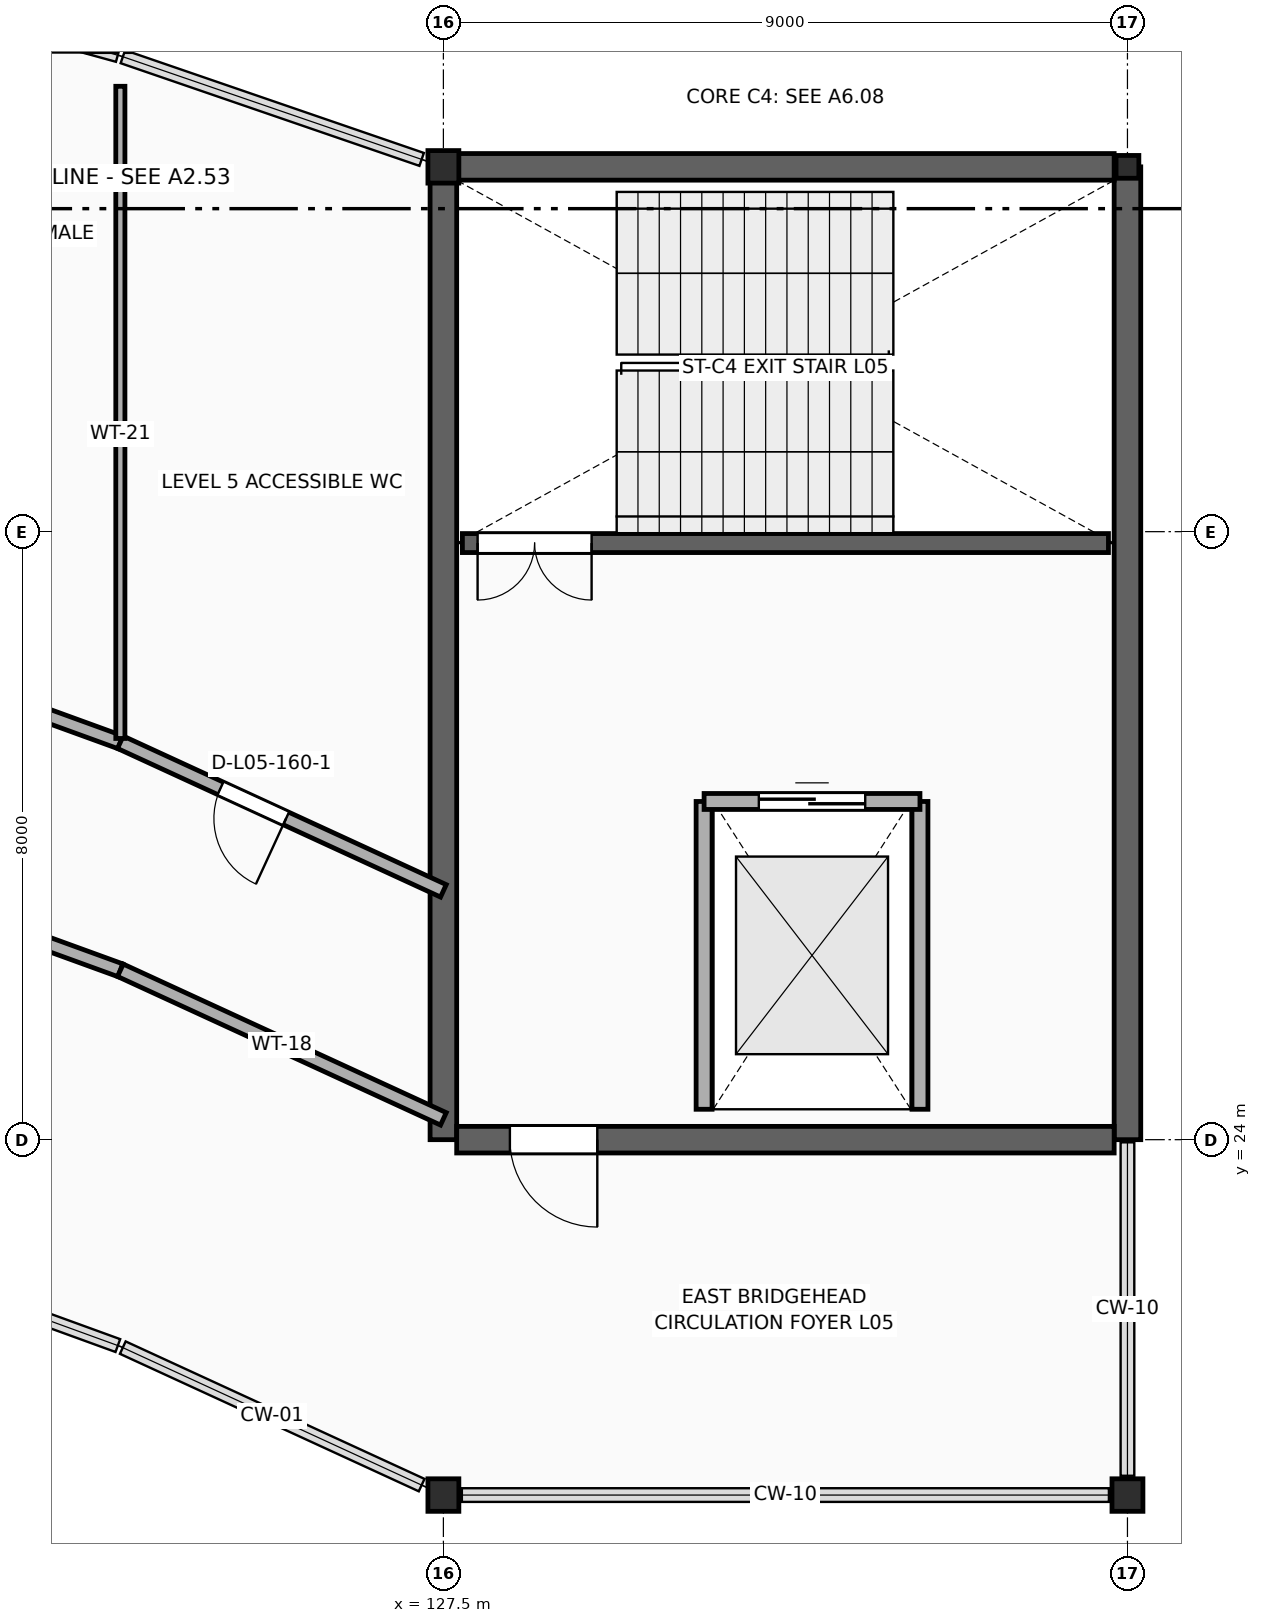
"""IFC4 building model, lengths in metres.
Left out: names, types, materials, properties, quantities, classifications, styles, units other than length and angle.
Written with IfcOpenShell. Run it as: python <this file> out.ifc"""

import sys

from ifc_helpers import new_model, si_unit, direction, frame, frame_2d, origin, origin_2d, place, context, subcontext, project, spatial, rectangle, i_section, extrude, element, fill, save


model = new_model("IFC4")
c1 = context("Model", 3, precision=1e-05, world=origin(), true_north=direction((0.0, 1.0)))
c2 = subcontext(c1, "Body", "Model", "MODEL_VIEW")
j1 = project(units=[si_unit("LENGTHUNIT", "METRE"), si_unit("PLANEANGLEUNIT", "RADIAN")], contexts=[c1])
p1 = place(None, origin())
s1 = spatial("IfcSite", under=j1, at=p1, CompositionType="ELEMENT")
p2 = place(p1, origin())
s2 = spatial("IfcBuilding", under=s1, at=p2, CompositionType="ELEMENT")
p3 = place(p2, frame((0.0, 0.0, 24.6)))
s3 = spatial("IfcBuildingStorey", under=s2, at=p3, CompositionType="ELEMENT", Elevation=24.6)
for number, where, z_axis, x_axis in (
    (1, (127.5, 24.0, 0.0), (0.0, 0.0, 1.0), (0.0, 1.0, 0.0)),
    (2, (136.5, 24.0, 0.0), (0.0, 0.0, 1.0), (0.0, 1.0, 0.0)),
):
    element("IfcWall", number, at=place(p3, frame(where, z_axis=z_axis, x_axis=x_axis)), inside=s3, PredefinedType="SHEAR", context=c2, shape_type="SweptSolid", body=[
        extrude(rectangle(XDim=12.8, YDim=0.35, at=frame_2d((6.4, 0.0))), origin(), (0.0, 0.0, 1.0), 4.64),
    ])
p4 = place(p3, frame((127.675, 36.8, 0.0), z_axis=(0.0, 0.0, 1.0), x_axis=(1.0, 0.0, 0.0)))
e3 = element("IfcWall", 3, at=p4, inside=s3, PredefinedType="SHEAR", context=c2, shape_type="SweptSolid", body=[
    extrude(rectangle(XDim=8.65, YDim=0.35, at=frame_2d((4.325, 0.0))), origin(), (0.0, 0.0, 1.0), 4.64),
])
p5 = place(p3, frame((127.675, 24.0, 0.0), z_axis=(0.0, 0.0, 1.0), x_axis=(1.0, 0.0, 0.0)))
e4 = element("IfcWall", 4, at=p5, inside=s3, PredefinedType="SHEAR", context=c2, shape_type="SweptSolid", body=[
    extrude(rectangle(XDim=8.65, YDim=0.35, at=frame_2d((4.325, 0.0))), origin(), (0.0, 0.0, 1.0), 4.64),
])
p6 = place(p5, frame((0.7, 0.0, 0.0)))
e5 = element("IfcOpeningElement", 5, at=p6, cuts=e4, PredefinedType="OPENING", context=c2, shape_type="SweptSolid", body=[
    extrude(rectangle(XDim=1.15, YDim=2.2, at=frame_2d((0.575, 1.1))), frame((0.0, 0.187, 0.0), z_axis=(0.0, -1.0, 0.0), x_axis=(1.0, 0.0, 0.0)), (0.0, 0.0, 1.0), 0.374),
])
p7 = place(p3, frame((127.75, 31.85, 0.0), z_axis=(0.0, 0.0, 1.0), x_axis=(1.0, 0.0, 0.0)))
e6 = element("IfcWall", 6, at=p7, inside=s3, PredefinedType="STANDARD", context=c2, shape_type="SweptSolid", body=[
    extrude(rectangle(XDim=8.5, YDim=0.25, at=frame_2d((4.25, 0.0))), origin(), (0.0, 0.0, 1.0), 4.64),
])
p8 = place(p7, frame((0.2, 0.0, 0.0)))
e7 = element("IfcOpeningElement", 7, at=p8, cuts=e6, PredefinedType="OPENING", context=c2, shape_type="SweptSolid", body=[
    extrude(rectangle(XDim=1.5, YDim=2.2, at=frame_2d((0.75, 1.1))), frame((0.0, 0.137, 0.0), z_axis=(0.0, -1.0, 0.0), x_axis=(1.0, 0.0, 0.0)), (0.0, 0.0, 1.0), 0.274),
])
for number, where, z_axis, x_axis in (
    (8, (130.93, 24.4, 0.0), (0.0, 0.0, 1.0), (0.0, 1.0, 0.0)),
    (9, (133.77, 24.4, 0.0), (0.0, 0.0, 1.0), (0.0, 1.0, 0.0)),
):
    element("IfcWall", number, at=place(p3, frame(where, z_axis=z_axis, x_axis=x_axis)), inside=s3, PredefinedType="PARTITIONING", context=c2, shape_type="SweptSolid", body=[
        extrude(rectangle(XDim=4.05, YDim=0.21, at=frame_2d((2.025, 0.0))), origin(), (0.0, 0.0, 1.0), 4.64),
    ])
p9 = place(p3, frame((130.93, 28.45, 0.0), z_axis=(0.0, 0.0, 1.0), x_axis=(1.0, 0.0, 0.0)))
e10 = element("IfcWall", 10, at=p9, inside=s3, PredefinedType="PARTITIONING", context=c2, shape_type="SweptSolid", body=[
    extrude(rectangle(XDim=2.84, YDim=0.21, at=frame_2d((1.42, 0.0))), origin(), (0.0, 0.0, 1.0), 4.64),
])
p10 = place(p9, frame((0.72, 0.0, 0.0)))
e11 = element("IfcOpeningElement", 11, at=p10, cuts=e10, PredefinedType="OPENING", context=c2, shape_type="SweptSolid", body=[
    extrude(rectangle(XDim=1.4, YDim=2.35, at=frame_2d((0.7, 1.175))), frame((0.0, 0.117, 0.0), z_axis=(0.0, -1.0, 0.0), x_axis=(1.0, 0.0, 0.0)), (0.0, 0.0, 1.0), 0.234),
])
p11 = place(p3, frame((127.5, 36.8, 0.0), z_axis=(0.0, 0.0, 1.0), x_axis=(1.0, 0.0, 0.0)))
e12 = element("IfcColumn", 12, at=p11, inside=s3, PredefinedType="COLUMN", context=c2, shape_type="SweptSolid", body=[
    extrude(i_section(OverallWidth=0.407, OverallDepth=0.428, WebThickness=0.02, FlangeThickness=0.035, at=origin_2d()), origin(), (0.0, 0.0, 1.0), 4.54),
])
p12 = place(p3, frame((136.5, 36.8, 0.0), z_axis=(0.0, 0.0, 1.0), x_axis=(1.0, 0.0, 0.0)))
e13 = element("IfcColumn", 13, at=p12, inside=s3, PredefinedType="COLUMN", context=c2, shape_type="SweptSolid", body=[
    extrude(i_section(OverallWidth=0.3, OverallDepth=0.3, WebThickness=0.01, FlangeThickness=0.015, at=origin_2d()), origin(), (0.0, 0.0, 1.0), 4.54),
])
for number, where, z_axis, x_axis in (
    (14, (136.5, 19.324, 0.0), (0.0, 0.0, 1.0), (1.0, 0.0, 0.0)),
    (15, (127.5, 19.324, 0.0), (0.0, 0.0, 1.0), (1.0, 0.0, 0.0)),
):
    element("IfcColumn", number, at=place(p3, frame(where, z_axis=z_axis, x_axis=x_axis)), inside=s3, PredefinedType="COLUMN", context=c2, shape_type="SweptSolid", body=[
        extrude(i_section(OverallWidth=0.407, OverallDepth=0.428, WebThickness=0.02, FlangeThickness=0.035, at=origin_2d()), origin(), (0.0, 0.0, 1.0), 4.54),
    ])
p13 = place(p3, frame((119.0, 27.774, 0.0), z_axis=(0.0, 0.0, 1.0), x_axis=(0.939831249065, -0.341639024821, 0.0)))
e16 = element("IfcWall", 16, at=p13, inside=s3, PredefinedType="PARTITIONING", context=c2, shape_type="SweptSolid", body=[
    extrude(rectangle(XDim=4.522, YDim=0.18, at=frame_2d((2.261, 0.0))), origin(), (0.0, 0.0, 1.0), 3.618),
])
p14 = place(p3, frame((119.0, 30.774, 0.0), z_axis=(0.0, 0.0, 1.0), x_axis=(0.939831249065, -0.341639024821, 0.0)))
e17 = element("IfcWall", 17, at=p14, inside=s3, PredefinedType="PARTITIONING", context=c2, shape_type="SweptSolid", body=[
    extrude(rectangle(XDim=4.522, YDim=0.18, at=frame_2d((2.261, 0.0))), origin(), (0.0, 0.0, 1.0), 3.618),
])
p15 = place(p14, frame((1.45, 0.0, 0.0)))
e18 = element("IfcOpeningElement", 18, at=p15, cuts=e17, PredefinedType="OPENING", context=c2, shape_type="SweptSolid", body=[
    extrude(rectangle(XDim=0.9, YDim=2.15, at=frame_2d((0.45, 1.075))), frame((0.0, 0.102, 0.0), z_axis=(0.0, -1.0, 0.0), x_axis=(1.0, 0.0, 0.0)), (0.0, 0.0, 1.0), 0.204),
])
p16 = place(p3, frame((123.25, 26.229, 0.0), z_axis=(0.0, 0.0, 1.0), x_axis=(0.908484112169, -0.417919391673, 0.0)))
e19 = element("IfcWall", 19, at=p16, inside=s3, PredefinedType="PARTITIONING", context=c2, shape_type="SweptSolid", body=[
    extrude(rectangle(XDim=4.678, YDim=0.18, at=frame_2d((2.339, 0.0))), origin(), (0.0, 0.0, 1.0), 3.618),
])
p17 = place(p3, frame((123.25, 29.229, 0.0), z_axis=(0.0, 0.0, 1.0), x_axis=(0.908484112169, -0.417919391673, 0.0)))
e20 = element("IfcWall", 20, at=p17, inside=s3, PredefinedType="PARTITIONING", context=c2, shape_type="SweptSolid", body=[
    extrude(rectangle(XDim=4.678, YDim=0.18, at=frame_2d((2.339, 0.0))), origin(), (0.0, 0.0, 1.0), 3.618),
])
p18 = place(p17, frame((1.45, 0.0, 0.0)))
e21 = element("IfcOpeningElement", 21, at=p18, cuts=e20, PredefinedType="OPENING", context=c2, shape_type="SweptSolid", body=[
    extrude(rectangle(XDim=0.95, YDim=2.15, at=frame_2d((0.475, 1.075))), frame((0.0, 0.102, 0.0), z_axis=(0.0, -1.0, 0.0), x_axis=(1.0, 0.0, 0.0)), (0.0, 0.0, 1.0), 0.204),
])
p19 = place(p3, frame((123.25, 29.279, 0.0), z_axis=(0.0, 0.0, 1.0), x_axis=(0.0, 1.0, 0.0)))
e22 = element("IfcWall", 22, at=p19, inside=s3, PredefinedType="PARTITIONING", context=c2, shape_type="SweptSolid", body=[
    extrude(rectangle(XDim=8.581, YDim=0.12, at=frame_2d((4.291, 0.0))), origin(), (0.0, 0.0, 1.0), 3.618),
])
p20 = place(p8, frame((1.5, 0.0, 0.0), z_axis=(0.0, 0.0, 1.0), x_axis=(-1.0, 0.0, 0.0)))
e23 = element("IfcDoor", 23, at=p20, inside=s3, OperationType="DOUBLE_DOOR_SINGLE_SWING", PredefinedType="DOOR", context=c2, shape_type="SweptSolid", body=[
    extrude(rectangle(XDim=1.5, YDim=2.2, at=frame_2d((0.75, 1.1))), frame((0.0, 0.025, 0.0), z_axis=(0.0, -1.0, 0.0), x_axis=(1.0, 0.0, 0.0)), (0.0, 0.0, 1.0), 0.05),
])
fill(e7, e23)
p21 = place(p10, origin())
e24 = element("IfcDoor", 24, at=p21, inside=s3, OperationType="DOUBLE_DOOR_SLIDING", PredefinedType="DOOR", context=c2, shape_type="SweptSolid", body=[
    extrude(rectangle(XDim=1.4, YDim=2.35, at=frame_2d((0.7, 1.175))), frame((0.0, 0.025, 0.0), z_axis=(0.0, -1.0, 0.0), x_axis=(1.0, 0.0, 0.0)), (0.0, 0.0, 1.0), 0.05),
])
fill(e11, e24)
p22 = place(p6, frame((1.15, 0.0, 0.0), z_axis=(0.0, 0.0, 1.0), x_axis=(-1.0, 0.0, 0.0)))
e25 = element("IfcDoor", 25, at=p22, inside=s3, OperationType="SINGLE_SWING_RIGHT", PredefinedType="DOOR", context=c2, shape_type="SweptSolid", body=[
    extrude(rectangle(XDim=1.15, YDim=2.2, at=frame_2d((0.575, 1.1))), frame((0.0, 0.025, 0.0), z_axis=(0.0, -1.0, 0.0), x_axis=(1.0, 0.0, 0.0)), (0.0, 0.0, 1.0), 0.05),
])
fill(e5, e25)
p23 = place(p18, frame((0.95, 0.0, 0.0), z_axis=(0.0, 0.0, 1.0), x_axis=(-1.0, 0.0, 0.0)))
e26 = element("IfcDoor", 26, at=p23, inside=s3, OperationType="SINGLE_SWING_RIGHT", PredefinedType="DOOR", context=c2, shape_type="SweptSolid", body=[
    extrude(rectangle(XDim=0.95, YDim=2.15, at=frame_2d((0.475, 1.075))), frame((0.0, 0.025, 0.0), z_axis=(0.0, -1.0, 0.0), x_axis=(1.0, 0.0, 0.0)), (0.0, 0.0, 1.0), 0.05),
])
fill(e21, e26)
save(model, sys.argv[1])
